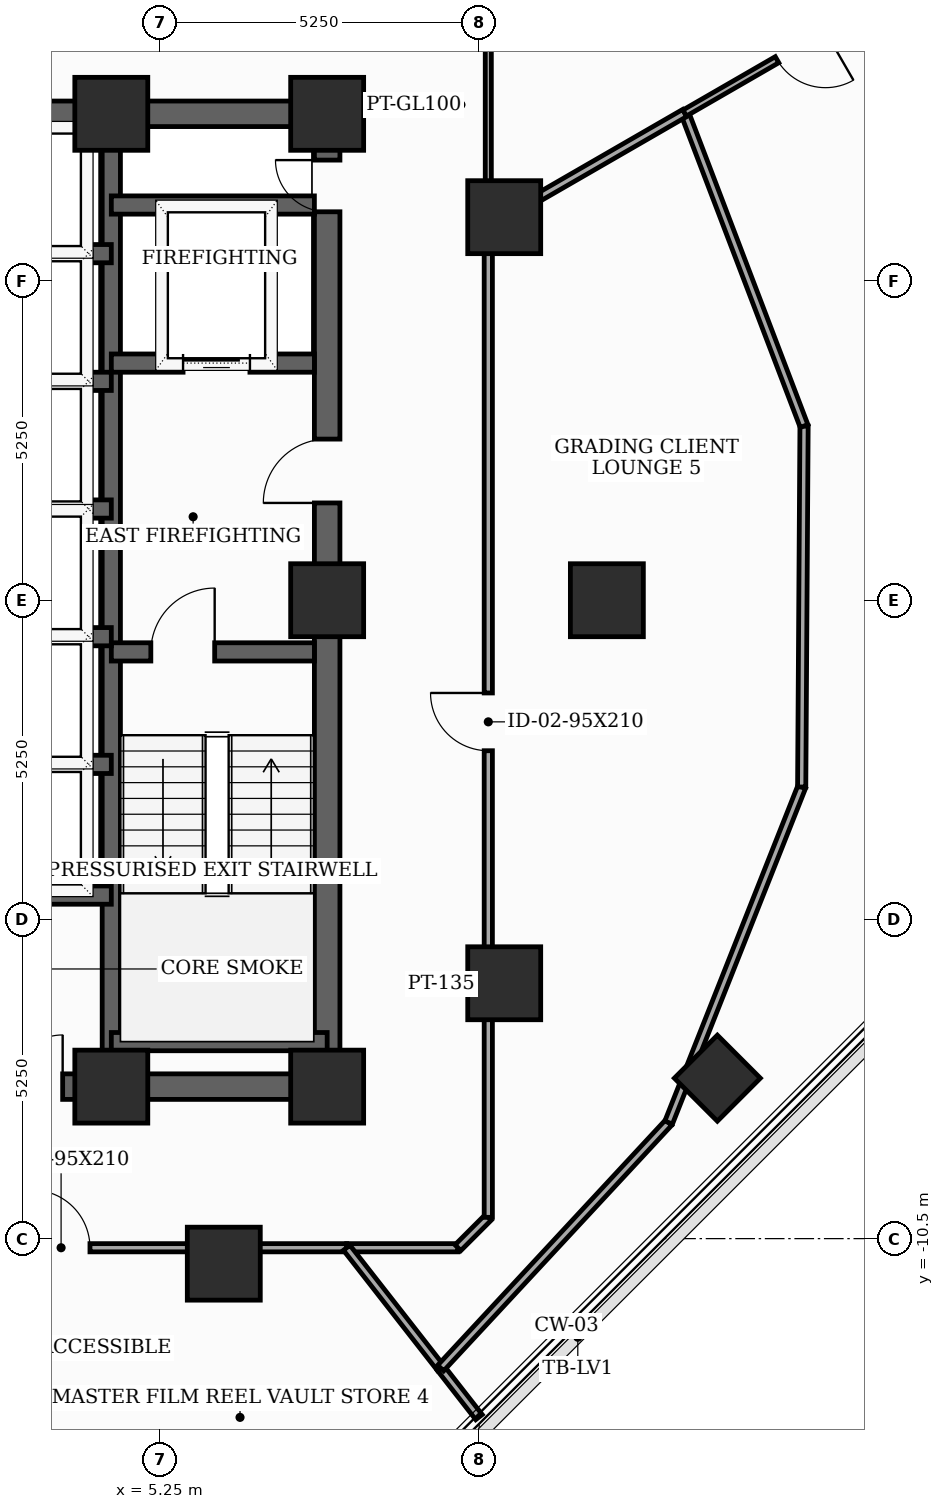
"""IFC4 building model, lengths in metres.
Left out: names, types, materials, properties, quantities, classifications, styles, units other than length and angle.
Written with IfcOpenShell. Run it as: python <this file> out.ifc"""

import sys

from ifc_helpers import new_model, si_unit, direction, frame, frame_2d, origin, origin_2d, place, context, subcontext, project, spatial, rectangle, extrude, element, fill, save


model = new_model("IFC4")
c1 = context("Model", 3, precision=1e-05, world=origin(), true_north=direction((0.0, 1.0)))
c2 = subcontext(c1, "Body", "Model", "MODEL_VIEW")
j1 = project(units=[si_unit("LENGTHUNIT", "METRE"), si_unit("PLANEANGLEUNIT", "RADIAN")], contexts=[c1])
p1 = place(None, origin())
s1 = spatial("IfcSite", under=j1, at=p1, CompositionType="ELEMENT")
p2 = place(p1, origin())
s2 = spatial("IfcBuilding", under=s1, at=p2, CompositionType="ELEMENT")
p3 = place(p2, frame((0.0, 0.0, 206.4)))
s3 = spatial("IfcBuildingStorey", under=s2, at=p3, CompositionType="ELEMENT", Elevation=206.4)
for number, where, z_axis, x_axis in (
    (1, (4.45, -8.0, 0.0), (0.0, 0.0, 1.0), (1.0, 0.0, 0.0)),
    (2, (8.0, -8.0, 0.0), (0.0, 0.0, 1.0), (1.0, 0.0, 0.0)),
    (3, (8.0, 0.0, 0.0), (0.0, 0.0, 1.0), (1.0, 0.0, 0.0)),
    (4, (8.0, 8.0, 0.0), (0.0, 0.0, 1.0), (1.0, 0.0, 0.0)),
    (5, (4.45, 8.0, 0.0), (0.0, 0.0, 1.0), (1.0, 0.0, 0.0)),
    (6, (12.6, 0.0, 0.0), (0.0, 0.0, 1.0), (1.0, 0.0, 0.0)),
    (7, (10.912, 6.3, 0.0), (0.0, 0.0, 1.0), (1.0, 0.0, 0.0)),
    (8, (6.3, -10.912, 0.0), (0.0, 0.0, 1.0), (1.0, 0.0, 0.0)),
    (9, (10.912, -6.3, 0.0), (0.0, 0.0, 1.0), (1.0, 0.0, 0.0)),
):
    element("IfcColumn", number, at=place(p3, frame(where, z_axis=z_axis, x_axis=x_axis)), inside=s3, PredefinedType="COLUMN", context=c2, shape_type="SweptSolid", body=[
        extrude(rectangle(XDim=1.2, YDim=1.2, at=origin_2d()), origin(), (0.0, 0.0, 1.0), 3.7),
    ])
p4 = place(p3, frame((14.417, -7.861, 0.0), z_axis=(0.0, 0.0, 1.0), x_axis=(0.707106781187, 0.707106781187, 0.0)))
e10 = element("IfcColumn", 10, at=p4, inside=s3, PredefinedType="COLUMN", context=c2, shape_type="SweptSolid", body=[
    extrude(rectangle(XDim=1.0, YDim=1.0, at=origin_2d()), origin(), (0.0, 0.0, 1.0), 3.7),
])
p5 = place(p3, frame((8.0, -8.0, 0.0), z_axis=(0.0, 0.0, 1.0), x_axis=(0.0, 1.0, 0.0)))
e11 = element("IfcWall", 11, at=p5, inside=s3, PredefinedType="SHEAR", context=c2, shape_type="SweptSolid", body=[
    extrude(rectangle(XDim=16.0, YDim=0.42, at=frame_2d((8.0, 0.0))), origin(), (0.0, 0.0, 1.0), 3.5),
])
p6 = place(p5, frame((9.6, 0.0, 0.0)))
e12 = element("IfcOpeningElement", 12, at=p6, cuts=e11, PredefinedType="OPENING", context=c2, shape_type="SweptSolid", body=[
    extrude(rectangle(XDim=1.05, YDim=2.15, at=frame_2d((0.525, 1.075))), frame((0.0, 0.22, 0.0), z_axis=(0.0, -1.0, 0.0), x_axis=(1.0, 0.0, 0.0)), (0.0, 0.0, 1.0), 0.44),
])
p7 = place(p5, frame((14.389, 0.0, 0.0)))
e13 = element("IfcOpeningElement", 13, at=p7, cuts=e11, PredefinedType="OPENING", context=c2, shape_type="SweptSolid", body=[
    extrude(rectangle(XDim=0.85, YDim=2.02, at=frame_2d((0.425, 1.01))), frame((0.0, 0.22, 0.0), z_axis=(0.0, -1.0, 0.0), x_axis=(1.0, 0.0, 0.0)), (0.0, 0.0, 1.0), 0.44),
])
p8 = place(p3, frame((-8.0, -8.0, 0.0), z_axis=(0.0, 0.0, 1.0), x_axis=(1.0, 0.0, 0.0)))
e14 = element("IfcWall", 14, at=p8, inside=s3, PredefinedType="SHEAR", context=c2, shape_type="SweptSolid", body=[
    extrude(rectangle(XDim=16.0, YDim=0.42, at=frame_2d((8.0, 0.0))), origin(), (0.0, 0.0, 1.0), 3.5),
])
p9 = place(p8, frame((4.35, 0.0, 0.0)))
e15 = element("IfcOpeningElement", 15, at=p9, cuts=e14, PredefinedType="OPENING", context=c2, shape_type="SweptSolid", body=[
    extrude(rectangle(XDim=0.85, YDim=2.02, at=frame_2d((0.425, 1.01))), frame((0.0, 0.22, 0.0), z_axis=(0.0, -1.0, 0.0), x_axis=(1.0, 0.0, 0.0)), (0.0, 0.0, 1.0), 0.44),
])
p10 = place(p8, frame((6.49, 0.0, 0.0)))
e16 = element("IfcOpeningElement", 16, at=p10, cuts=e14, PredefinedType="OPENING", context=c2, shape_type="SweptSolid", body=[
    extrude(rectangle(XDim=0.85, YDim=2.02, at=frame_2d((0.425, 1.01))), frame((0.0, 0.22, 0.0), z_axis=(0.0, -1.0, 0.0), x_axis=(1.0, 0.0, 0.0)), (0.0, 0.0, 1.0), 0.44),
])
p11 = place(p8, frame((8.69, 0.0, 0.0)))
e17 = element("IfcOpeningElement", 17, at=p11, cuts=e14, PredefinedType="OPENING", context=c2, shape_type="SweptSolid", body=[
    extrude(rectangle(XDim=0.85, YDim=2.02, at=frame_2d((0.425, 1.01))), frame((0.0, 0.22, 0.0), z_axis=(0.0, -1.0, 0.0), x_axis=(1.0, 0.0, 0.0)), (0.0, 0.0, 1.0), 0.44),
])
p12 = place(p8, frame((10.8, 0.0, 0.0)))
e18 = element("IfcOpeningElement", 18, at=p12, cuts=e14, PredefinedType="OPENING", context=c2, shape_type="SweptSolid", body=[
    extrude(rectangle(XDim=0.85, YDim=2.02, at=frame_2d((0.425, 1.01))), frame((0.0, 0.22, 0.0), z_axis=(0.0, -1.0, 0.0), x_axis=(1.0, 0.0, 0.0)), (0.0, 0.0, 1.0), 0.44),
])
p13 = place(p3, frame((-8.0, 8.0, 0.0), z_axis=(0.0, 0.0, 1.0), x_axis=(1.0, 0.0, 0.0)))
e19 = element("IfcWall", 19, at=p13, inside=s3, PredefinedType="SHEAR", context=c2, shape_type="SweptSolid", body=[
    extrude(rectangle(XDim=16.0, YDim=0.42, at=frame_2d((8.0, 0.0))), origin(), (0.0, 0.0, 1.0), 3.5),
])
p14 = place(p13, frame((7.1, 0.0, 0.0)))
e20 = element("IfcOpeningElement", 20, at=p14, cuts=e19, PredefinedType="OPENING", context=c2, shape_type="SweptSolid", body=[
    extrude(rectangle(XDim=1.8, YDim=2.15, at=frame_2d((0.9, 1.075))), frame((0.0, 0.22, 0.0), z_axis=(0.0, -1.0, 0.0), x_axis=(1.0, 0.0, 0.0)), (0.0, 0.0, 1.0), 0.44),
])
p15 = place(p3, frame((4.45, -7.79, 0.0), z_axis=(0.0, 0.0, 1.0), x_axis=(0.0, 1.0, 0.0)))
e21 = element("IfcWall", 21, at=p15, inside=s3, PredefinedType="SHEAR", context=c2, shape_type="SweptSolid", body=[
    extrude(rectangle(XDim=15.58, YDim=0.3, at=frame_2d((7.79, 0.0))), origin(), (0.0, 0.0, 1.0), 3.5),
])
p16 = place(p3, frame((4.45, -0.85, 0.0), z_axis=(0.0, 0.0, 1.0), x_axis=(1.0, 0.0, 0.0)))
e22 = element("IfcWall", 22, at=p16, inside=s3, PredefinedType="SHEAR", context=c2, shape_type="SweptSolid", body=[
    extrude(rectangle(XDim=3.34, YDim=0.3, at=frame_2d((1.67, 0.0))), origin(), (0.0, 0.0, 1.0), 3.5),
])
p17 = place(p16, frame((0.65, 0.0, 0.0)))
e23 = element("IfcOpeningElement", 23, at=p17, cuts=e22, PredefinedType="OPENING", context=c2, shape_type="SweptSolid", body=[
    extrude(rectangle(XDim=1.05, YDim=2.15, at=frame_2d((0.525, 1.075))), frame((0.0, 0.16, 0.0), z_axis=(0.0, -1.0, 0.0), x_axis=(1.0, 0.0, 0.0)), (0.0, 0.0, 1.0), 0.32),
])
p18 = place(p3, frame((4.45, -7.26, 0.0), z_axis=(0.0, 0.0, 1.0), x_axis=(1.0, 0.0, 0.0)))
e24 = element("IfcWall", 24, at=p18, inside=s3, PredefinedType="SHEAR", context=c2, shape_type="SweptSolid", body=[
    extrude(rectangle(XDim=3.55, YDim=0.3, at=frame_2d((1.775, 0.0))), origin(), (0.0, 0.0, 1.0), 3.5),
])
p19 = place(p3, frame((4.45, 3.9, 0.0), z_axis=(0.0, 0.0, 1.0), x_axis=(1.0, 0.0, 0.0)))
e25 = element("IfcWall", 25, at=p19, inside=s3, PredefinedType="SHEAR", context=c2, shape_type="SweptSolid", body=[
    extrude(rectangle(XDim=3.34, YDim=0.3, at=frame_2d((1.67, 0.0))), origin(), (0.0, 0.0, 1.0), 3.5),
])
p20 = place(p19, frame((1.18, 0.0, 0.0)))
e26 = element("IfcOpeningElement", 26, at=p20, cuts=e25, PredefinedType="OPENING", context=c2, shape_type="SweptSolid", body=[
    extrude(rectangle(XDim=1.1, YDim=2.1, at=frame_2d((0.55, 1.05))), frame((0.0, 0.16, 0.0), z_axis=(0.0, -1.0, 0.0), x_axis=(1.0, 0.0, 0.0)), (0.0, 0.0, 1.0), 0.32),
])
p21 = place(p3, frame((4.45, 6.5, 0.0), z_axis=(0.0, 0.0, 1.0), x_axis=(1.0, 0.0, 0.0)))
e27 = element("IfcWall", 27, at=p21, inside=s3, PredefinedType="SHEAR", context=c2, shape_type="SweptSolid", body=[
    extrude(rectangle(XDim=3.34, YDim=0.3, at=frame_2d((1.67, 0.0))), origin(), (0.0, 0.0, 1.0), 3.5),
])
p22 = place(p3, frame((-4.45, -4.85, 0.0), z_axis=(0.0, 0.0, 1.0), x_axis=(1.0, 0.0, 0.0)))
e28 = element("IfcWall", 28, at=p22, inside=s3, PredefinedType="SHEAR", context=c2, shape_type="SweptSolid", body=[
    extrude(rectangle(XDim=8.9, YDim=0.3, at=frame_2d((4.45, 0.0))), origin(), (0.0, 0.0, 1.0), 3.5),
])
for number, where, z_axis, x_axis in (
    (29, (1.68, 1.5, 0.0), (0.0, 0.0, 1.0), (1.0, 0.0, 0.0)),
    (30, (1.68, 3.6, 0.0), (0.0, 0.0, 1.0), (1.0, 0.0, 0.0)),
    (31, (1.68, 5.7, 0.0), (0.0, 0.0, 1.0), (1.0, 0.0, 0.0)),
    (32, (1.68, -2.7, 0.0), (0.0, 0.0, 1.0), (1.0, 0.0, 0.0)),
    (33, (1.68, -0.6, 0.0), (0.0, 0.0, 1.0), (1.0, 0.0, 0.0)),
):
    element("IfcWall", number, at=place(p3, frame(where, z_axis=z_axis, x_axis=x_axis)), inside=s3, PredefinedType="SHEAR", context=c2, shape_type="SweptSolid", body=[
        extrude(rectangle(XDim=2.77, YDim=0.3, at=frame_2d((1.385, 0.0))), origin(), (0.0, 0.0, 1.0), 3.5),
    ])
p23 = place(p3, frame((2.45, -10.65, 0.0), z_axis=(0.0, 0.0, 1.0), x_axis=(1.0, 0.0, 0.0)))
e34 = element("IfcWall", 34, at=p23, inside=s3, PredefinedType="PARTITIONING", context=c2, shape_type="SweptSolid", body=[
    extrude(rectangle(XDim=5.871, YDim=0.135, at=frame_2d((2.936, 0.0))), origin(), (0.0, 0.0, 1.0), 2.885),
])
p24 = place(p23, frame((0.699, 0.0, 0.0)))
e35 = element("IfcOpeningElement", 35, at=p24, cuts=e34, PredefinedType="OPENING", context=c2, shape_type="SweptSolid", body=[
    extrude(rectangle(XDim=0.95, YDim=2.1, at=frame_2d((0.475, 1.05))), frame((0.0, 0.077, 0.0), z_axis=(0.0, -1.0, 0.0), x_axis=(1.0, 0.0, 0.0)), (0.0, 0.0, 1.0), 0.155),
])
p25 = place(p3, frame((8.321, -10.65, 0.0), z_axis=(0.0, 0.0, 1.0), x_axis=(1.0, 0.0, 0.0)))
e36 = element("IfcWall", 36, at=p25, inside=s3, PredefinedType="PARTITIONING", context=c2, shape_type="SweptSolid", body=[
    extrude(rectangle(XDim=1.829, YDim=0.135, at=frame_2d((0.915, 0.0))), origin(), (0.0, 0.0, 1.0), 3.5),
])
p26 = place(p3, frame((10.15, -10.65, 0.0), z_axis=(0.0, 0.0, 1.0), x_axis=(0.707106781187, 0.707106781187, 0.0)))
e37 = element("IfcWall", 37, at=p26, inside=s3, PredefinedType="PARTITIONING", context=c2, shape_type="SweptSolid", body=[
    extrude(rectangle(XDim=0.707, YDim=0.135, at=frame_2d((0.354, 0.0))), origin(), (0.0, 0.0, 1.0), 3.5),
])
p27 = place(p3, frame((10.65, -10.15, 0.0), z_axis=(0.0, 0.0, 1.0), x_axis=(0.0, 1.0, 0.0)))
e38 = element("IfcWall", 38, at=p27, inside=s3, PredefinedType="PARTITIONING", context=c2, shape_type="SweptSolid", body=[
    extrude(rectangle(XDim=16.299, YDim=0.135, at=frame_2d((8.149, 0.0))), origin(), (0.0, 0.0, 1.0), 2.885),
])
p28 = place(p27, frame((7.675, 0.0, 0.0)))
e39 = element("IfcOpeningElement", 39, at=p28, cuts=e38, PredefinedType="OPENING", context=c2, shape_type="SweptSolid", body=[
    extrude(rectangle(XDim=0.95, YDim=2.1, at=frame_2d((0.475, 1.05))), frame((0.0, 0.077, 0.0), z_axis=(0.0, -1.0, 0.0), x_axis=(1.0, 0.0, 0.0)), (0.0, 0.0, 1.0), 0.155),
])
p29 = place(p3, frame((10.65, 6.149, 0.0), z_axis=(0.0, 0.0, 1.0), x_axis=(0.0, 1.0, 0.0)))
e40 = element("IfcWall", 40, at=p29, inside=s3, PredefinedType="MOVABLE", context=c2, shape_type="SweptSolid", body=[
    extrude(rectangle(XDim=4.001, YDim=0.1, at=frame_2d((2.0, 0.0))), origin(), (0.0, 0.0, 1.0), 2.885),
])
p30 = place(p3, frame((9.867, -12.629, 0.0), z_axis=(0.0, 0.0, 1.0), x_axis=(-0.615594988766, 0.788062694084, 0.0)))
e41 = element("IfcWall", 41, at=p30, inside=s3, PredefinedType="PARTITIONING", context=c2, shape_type="SweptSolid", body=[
    extrude(rectangle(XDim=2.511, YDim=0.135, at=frame_2d((1.256, 0.0))), origin(), (0.0, 0.0, 1.0), 2.985),
])
p31 = place(p3, frame((10.497, -13.436, 0.0), z_axis=(0.0, 0.0, 1.0), x_axis=(-0.615343153806, 0.788259350128, 0.0)))
e42 = element("IfcWall", 42, at=p31, inside=s3, PredefinedType="PARTITIONING", context=c2, shape_type="SweptSolid", body=[
    extrude(rectangle(XDim=1.024, YDim=0.135, at=frame_2d((0.512, 0.0))), origin(), (0.0, 0.0, 1.0), 3.5),
])
p32 = place(p3, frame((9.867, -12.629, 0.0), z_axis=(0.0, 0.0, 1.0), x_axis=(0.680412009191, 0.732829787706, 0.0)))
e43 = element("IfcWall", 43, at=p32, inside=s3, PredefinedType="PARTITIONING", context=c2, shape_type="SweptSolid", body=[
    extrude(rectangle(XDim=5.51, YDim=0.135, at=frame_2d((2.755, 0.0))), origin(), (0.0, 0.0, 1.0), 2.985),
])
p33 = place(p3, frame((13.616, -8.591, 0.0), z_axis=(0.0, 0.0, 1.0), x_axis=(0.368538720499, 0.929612398526, 0.0)))
e44 = element("IfcWall", 44, at=p33, inside=s3, PredefinedType="PARTITIONING", context=c2, shape_type="SweptSolid", body=[
    extrude(rectangle(XDim=5.937, YDim=0.135, at=frame_2d((2.969, 0.0))), origin(), (0.0, 0.0, 1.0), 2.985),
])
p34 = place(p3, frame((15.804, -3.072, 0.0), z_axis=(0.0, 0.0, 1.0), x_axis=(0.006579346037, 0.999978355869, 0.0)))
e45 = element("IfcWall", 45, at=p34, inside=s3, PredefinedType="PARTITIONING", context=c2, shape_type="SweptSolid", body=[
    extrude(rectangle(XDim=5.937, YDim=0.135, at=frame_2d((2.969, 0.0))), origin(), (0.0, 0.0, 1.0), 2.985),
])
p35 = place(p3, frame((15.843, 2.865, 0.0), z_axis=(0.0, 0.0, 1.0), x_axis=(-0.356314091201, 0.934366238908, 0.0)))
e46 = element("IfcWall", 46, at=p35, inside=s3, PredefinedType="PARTITIONING", context=c2, shape_type="SweptSolid", body=[
    extrude(rectangle(XDim=5.51, YDim=0.135, at=frame_2d((2.755, 0.0))), origin(), (0.0, 0.0, 1.0), 3.5),
])
p36 = place(p3, frame((13.88, 8.013, 0.0), z_axis=(0.0, 0.0, 1.0), x_axis=(-0.866120184914, -0.499835798323, 0.0)))
e47 = element("IfcWall", 47, at=p36, inside=s3, PredefinedType="PARTITIONING", context=c2, shape_type="SweptSolid", body=[
    extrude(rectangle(XDim=3.729, YDim=0.135, at=frame_2d((1.865, 0.0))), origin(), (0.0, 0.0, 1.0), 2.885),
])
p37 = place(p3, frame((20.726, 11.966, 0.0), z_axis=(0.0, 0.0, 1.0), x_axis=(-0.865993758931, -0.500054806489, 0.0)))
e48 = element("IfcWall", 48, at=p37, inside=s3, PredefinedType="PARTITIONING", context=c2, shape_type="SweptSolid", body=[
    extrude(rectangle(XDim=7.906, YDim=0.115, at=frame_2d((3.953, 0.0))), origin(), (0.0, 0.0, 1.0), 2.985),
])
p38 = place(p37, frame((5.232, 0.0, 0.0)))
e49 = element("IfcOpeningElement", 49, at=p38, cuts=e48, PredefinedType="OPENING", context=c2, shape_type="SweptSolid", body=[
    extrude(rectangle(XDim=0.92, YDim=2.1, at=frame_2d((0.46, 1.05))), frame((0.0, 0.067, 0.0), z_axis=(0.0, -1.0, 0.0), x_axis=(1.0, 0.0, 0.0)), (0.0, 0.0, 1.0), 0.135),
])
p39 = place(p6, origin())
e50 = element("IfcDoor", 50, at=p39, inside=s3, OperationType="SINGLE_SWING_LEFT", PredefinedType="DOOR", context=c2, shape_type="SweptSolid", body=[
    extrude(rectangle(XDim=1.05, YDim=2.15, at=frame_2d((0.525, 1.075))), frame((0.0, 0.025, 0.0), z_axis=(0.0, -1.0, 0.0), x_axis=(1.0, 0.0, 0.0)), (0.0, 0.0, 1.0), 0.05),
])
fill(e12, e50)
p40 = place(p7, origin())
e51 = element("IfcDoor", 51, at=p40, inside=s3, OperationType="SINGLE_SWING_RIGHT", PredefinedType="TRAPDOOR", context=c2, shape_type="SweptSolid", body=[
    extrude(rectangle(XDim=0.85, YDim=2.02, at=frame_2d((0.425, 1.01))), frame((0.0, 0.025, 0.0), z_axis=(0.0, -1.0, 0.0), x_axis=(1.0, 0.0, 0.0)), (0.0, 0.0, 1.0), 0.05),
])
fill(e13, e51)
p41 = place(p12, origin())
e52 = element("IfcDoor", 52, at=p41, inside=s3, OperationType="SINGLE_SWING_RIGHT", PredefinedType="TRAPDOOR", context=c2, shape_type="SweptSolid", body=[
    extrude(rectangle(XDim=0.85, YDim=2.02, at=frame_2d((0.425, 1.01))), frame((0.0, 0.025, 0.0), z_axis=(0.0, -1.0, 0.0), x_axis=(1.0, 0.0, 0.0)), (0.0, 0.0, 1.0), 0.05),
])
fill(e18, e52)
p42 = place(p17, origin())
e53 = element("IfcDoor", 53, at=p42, inside=s3, OperationType="SINGLE_SWING_RIGHT", PredefinedType="DOOR", context=c2, shape_type="SweptSolid", body=[
    extrude(rectangle(XDim=1.05, YDim=2.15, at=frame_2d((0.525, 1.075))), frame((0.0, 0.025, 0.0), z_axis=(0.0, -1.0, 0.0), x_axis=(1.0, 0.0, 0.0)), (0.0, 0.0, 1.0), 0.05),
])
fill(e23, e53)
p43 = place(p20, origin())
e54 = element("IfcDoor", 54, at=p43, inside=s3, OperationType="SLIDING_TO_LEFT", PredefinedType="DOOR", context=c2, shape_type="SweptSolid", body=[
    extrude(rectangle(XDim=1.1, YDim=2.1, at=frame_2d((0.55, 1.05))), frame((0.0, 0.025, 0.0), z_axis=(0.0, -1.0, 0.0), x_axis=(1.0, 0.0, 0.0)), (0.0, 0.0, 1.0), 0.05),
])
fill(e26, e54)
p44 = place(p24, origin())
e55 = element("IfcDoor", 55, at=p44, inside=s3, OperationType="SINGLE_SWING_LEFT", PredefinedType="DOOR", context=c2, shape_type="SweptSolid", body=[
    extrude(rectangle(XDim=0.95, YDim=2.1, at=frame_2d((0.475, 1.05))), frame((0.0, 0.025, 0.0), z_axis=(0.0, -1.0, 0.0), x_axis=(1.0, 0.0, 0.0)), (0.0, 0.0, 1.0), 0.05),
])
fill(e35, e55)
p45 = place(p28, origin())
e56 = element("IfcDoor", 56, at=p45, inside=s3, OperationType="SINGLE_SWING_RIGHT", PredefinedType="DOOR", context=c2, shape_type="SweptSolid", body=[
    extrude(rectangle(XDim=0.95, YDim=2.1, at=frame_2d((0.475, 1.05))), frame((0.0, 0.025, 0.0), z_axis=(0.0, -1.0, 0.0), x_axis=(1.0, 0.0, 0.0)), (0.0, 0.0, 1.0), 0.05),
])
fill(e39, e56)
p46 = place(p38, origin())
e57 = element("IfcDoor", 57, at=p46, inside=s3, OperationType="SINGLE_SWING_LEFT", PredefinedType="DOOR", context=c2, shape_type="SweptSolid", body=[
    extrude(rectangle(XDim=0.92, YDim=2.1, at=frame_2d((0.46, 1.05))), frame((0.0, 0.025, 0.0), z_axis=(0.0, -1.0, 0.0), x_axis=(1.0, 0.0, 0.0)), (0.0, 0.0, 1.0), 0.05),
])
fill(e49, e57)
save(model, sys.argv[1])
